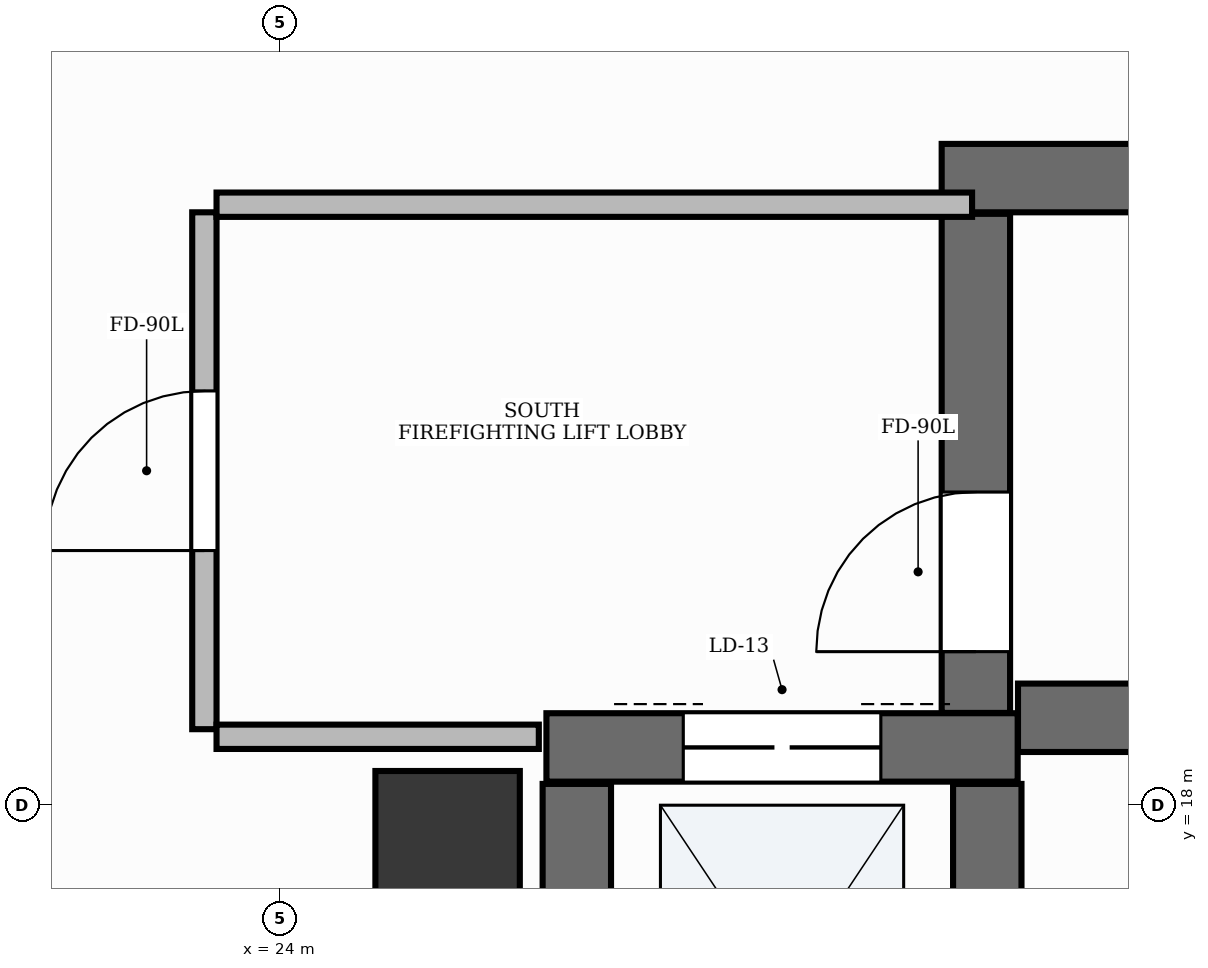
"""IFC4 building model, lengths in metres.
Left out: names, types, materials, properties, quantities, classifications, styles, units other than length and angle.
Written with IfcOpenShell. Run it as: python <this file> out.ifc"""

import sys

from ifc_helpers import new_model, si_unit, direction, frame, frame_2d, origin, origin_2d, place, context, subcontext, project, spatial, rectangle, extrude, element, fill, save


model = new_model("IFC4")
c1 = context("Model", 3, precision=1e-05, world=origin(), true_north=direction((0.0, 1.0)))
c2 = subcontext(c1, "Body", "Model", "MODEL_VIEW")
j1 = project(units=[si_unit("LENGTHUNIT", "METRE"), si_unit("PLANEANGLEUNIT", "RADIAN")], contexts=[c1])
p1 = place(None, origin())
s1 = spatial("IfcSite", under=j1, at=p1, CompositionType="ELEMENT")
p2 = place(p1, origin())
s2 = spatial("IfcBuilding", under=s1, at=p2, CompositionType="ELEMENT")
p3 = place(p2, frame((0.0, 0.0, -9.0)))
s3 = spatial("IfcBuildingStorey", under=s2, at=p3, CompositionType="ELEMENT", Elevation=-9.0)
p4 = place(p3, frame((28.852, 18.575, 0.0), z_axis=(0.0, 0.0, 1.0), x_axis=(1.0, 0.0, 0.0)))
e1 = element("IfcWall", 1, at=p4, inside=s3, PredefinedType="SHEAR", context=c2, shape_type="SweptSolid", body=[
    extrude(rectangle(XDim=8.248, YDim=0.45, at=frame_2d((4.124, 0.0))), origin(), (0.0, 0.0, 1.0), 4.18),
])
p5 = place(p3, frame((28.35, 22.125, 0.0), z_axis=(0.0, 0.0, 1.0), x_axis=(1.0, 0.0, 0.0)))
e2 = element("IfcWall", 2, at=p5, inside=s3, PredefinedType="SHEAR", context=c2, shape_type="SweptSolid", body=[
    extrude(rectangle(XDim=8.75, YDim=0.45, at=frame_2d((4.375, 0.0))), origin(), (0.0, 0.0, 1.0), 4.18),
])
p6 = place(p3, frame((28.575, 18.607, 0.0), z_axis=(0.0, 0.0, 1.0), x_axis=(0.0, 1.0, 0.0)))
e3 = element("IfcWall", 3, at=p6, inside=s3, PredefinedType="SHEAR", context=c2, shape_type="SweptSolid", body=[
    extrude(rectangle(XDim=3.283, YDim=0.45, at=frame_2d((1.642, 0.0))), origin(), (0.0, 0.0, 1.0), 4.18),
])
p7 = place(p6, frame((0.403, 0.0, 0.0)))
e4 = element("IfcOpeningElement", 4, at=p7, cuts=e3, PredefinedType="OPENING", context=c2, shape_type="SweptSolid", body=[
    extrude(rectangle(XDim=1.05, YDim=2.15, at=frame_2d((0.525, 1.075))), frame((0.0, 0.24, 0.0), z_axis=(0.0, -1.0, 0.0), x_axis=(1.0, 0.0, 0.0)), (0.0, 0.0, 1.0), 0.48),
])
p8 = place(p3, frame((25.75, 18.38, 0.0), z_axis=(0.0, 0.0, 1.0), x_axis=(1.0, 0.0, 0.0)))
e5 = element("IfcWall", 5, at=p8, inside=s3, PredefinedType="SHEAR", context=c2, shape_type="SweptSolid", body=[
    extrude(rectangle(XDim=3.1, YDim=0.45, at=frame_2d((1.55, 0.0))), origin(), (0.0, 0.0, 1.0), 4.18),
])
p9 = place(p8, frame((0.9, 0.0, 0.0)))
e6 = element("IfcOpeningElement", 6, at=p9, cuts=e5, PredefinedType="OPENING", context=c2, shape_type="SweptSolid", body=[
    extrude(rectangle(XDim=1.3, YDim=2.2, at=frame_2d((0.65, 1.1))), frame((0.0, 0.24, 0.0), z_axis=(0.0, -1.0, 0.0), x_axis=(1.0, 0.0, 0.0)), (0.0, 0.0, 1.0), 0.48),
])
for number, where, z_axis, x_axis in (
    (7, (25.95, 15.44, 0.0), (0.0, 0.0, 1.0), (0.0, 1.0, 0.0)),
    (8, (28.65, 15.44, 0.0), (0.0, 0.0, 1.0), (0.0, 1.0, 0.0)),
):
    element("IfcWall", number, at=place(p3, frame(where, z_axis=z_axis, x_axis=x_axis)), inside=s3, PredefinedType="SHEAR", context=c2, shape_type="SweptSolid", body=[
        extrude(rectangle(XDim=2.7, YDim=0.45, at=frame_2d((1.35, 0.0))), origin(), (0.0, 0.0, 1.0), 4.18),
    ])
p10 = place(p3, frame((25.1, 17.75, 0.0), z_axis=(0.0, 0.0, 1.0), x_axis=(1.0, 0.0, 0.0)))
e9 = element("IfcColumn", 9, at=p10, inside=s3, PredefinedType="PILASTER", context=c2, shape_type="SweptSolid", body=[
    extrude(rectangle(XDim=0.95, YDim=0.95, at=origin_2d()), origin(), (0.0, 0.0, 1.0), 4.18),
])
p11 = place(p3, frame((23.5, 18.5, 0.0), z_axis=(0.0, 0.0, 1.0), x_axis=(0.0, 1.0, 0.0)))
e10 = element("IfcWall", 10, at=p11, inside=s3, PredefinedType="PARTITIONING", context=c2, shape_type="SweptSolid", body=[
    extrude(rectangle(XDim=3.4, YDim=0.16, at=frame_2d((1.7, 0.0))), origin(), (0.0, 0.0, 1.0), 3.04),
])
p12 = place(p11, frame((1.175, 0.0, 0.0)))
e11 = element("IfcOpeningElement", 11, at=p12, cuts=e10, PredefinedType="OPENING", context=c2, shape_type="SweptSolid", body=[
    extrude(rectangle(XDim=1.05, YDim=2.15, at=frame_2d((0.525, 1.075))), frame((0.0, 0.095, 0.0), z_axis=(0.0, -1.0, 0.0), x_axis=(1.0, 0.0, 0.0)), (0.0, 0.0, 1.0), 0.19),
])
p13 = place(p3, frame((23.58, 21.95, 0.0), z_axis=(0.0, 0.0, 1.0), x_axis=(1.0, 0.0, 0.0)))
e12 = element("IfcWall", 12, at=p13, inside=s3, PredefinedType="PARTITIONING", context=c2, shape_type="SweptSolid", body=[
    extrude(rectangle(XDim=4.97, YDim=0.16, at=frame_2d((2.485, 0.0))), origin(), (0.0, 0.0, 1.0), 3.04),
])
p14 = place(p3, frame((23.58, 18.45, 0.0), z_axis=(0.0, 0.0, 1.0), x_axis=(1.0, 0.0, 0.0)))
e13 = element("IfcWall", 13, at=p14, inside=s3, PredefinedType="PARTITIONING", context=c2, shape_type="SweptSolid", body=[
    extrude(rectangle(XDim=2.12, YDim=0.16, at=frame_2d((1.06, 0.0))), origin(), (0.0, 0.0, 1.0), 3.04),
])
p15 = place(p7, origin())
e14 = element("IfcDoor", 14, at=p15, inside=s3, OperationType="SINGLE_SWING_LEFT", PredefinedType="DOOR", context=c2, shape_type="SweptSolid", body=[
    extrude(rectangle(XDim=1.05, YDim=2.15, at=frame_2d((0.525, 1.075))), frame((0.0, 0.025, 0.0), z_axis=(0.0, -1.0, 0.0), x_axis=(1.0, 0.0, 0.0)), (0.0, 0.0, 1.0), 0.05),
])
fill(e4, e14)
p16 = place(p9, origin())
e15 = element("IfcDoor", 15, at=p16, inside=s3, OperationType="DOUBLE_DOOR_SLIDING", PredefinedType="DOOR", context=c2, shape_type="SweptSolid", body=[
    extrude(rectangle(XDim=1.3, YDim=2.2, at=frame_2d((0.65, 1.1))), frame((0.0, 0.025, 0.0), z_axis=(0.0, -1.0, 0.0), x_axis=(1.0, 0.0, 0.0)), (0.0, 0.0, 1.0), 0.05),
])
fill(e6, e15)
p17 = place(p12, origin())
e16 = element("IfcDoor", 16, at=p17, inside=s3, OperationType="SINGLE_SWING_LEFT", PredefinedType="DOOR", context=c2, shape_type="SweptSolid", body=[
    extrude(rectangle(XDim=1.05, YDim=2.15, at=frame_2d((0.525, 1.075))), frame((0.0, 0.025, 0.0), z_axis=(0.0, -1.0, 0.0), x_axis=(1.0, 0.0, 0.0)), (0.0, 0.0, 1.0), 0.05),
])
fill(e11, e16)
save(model, sys.argv[1])
